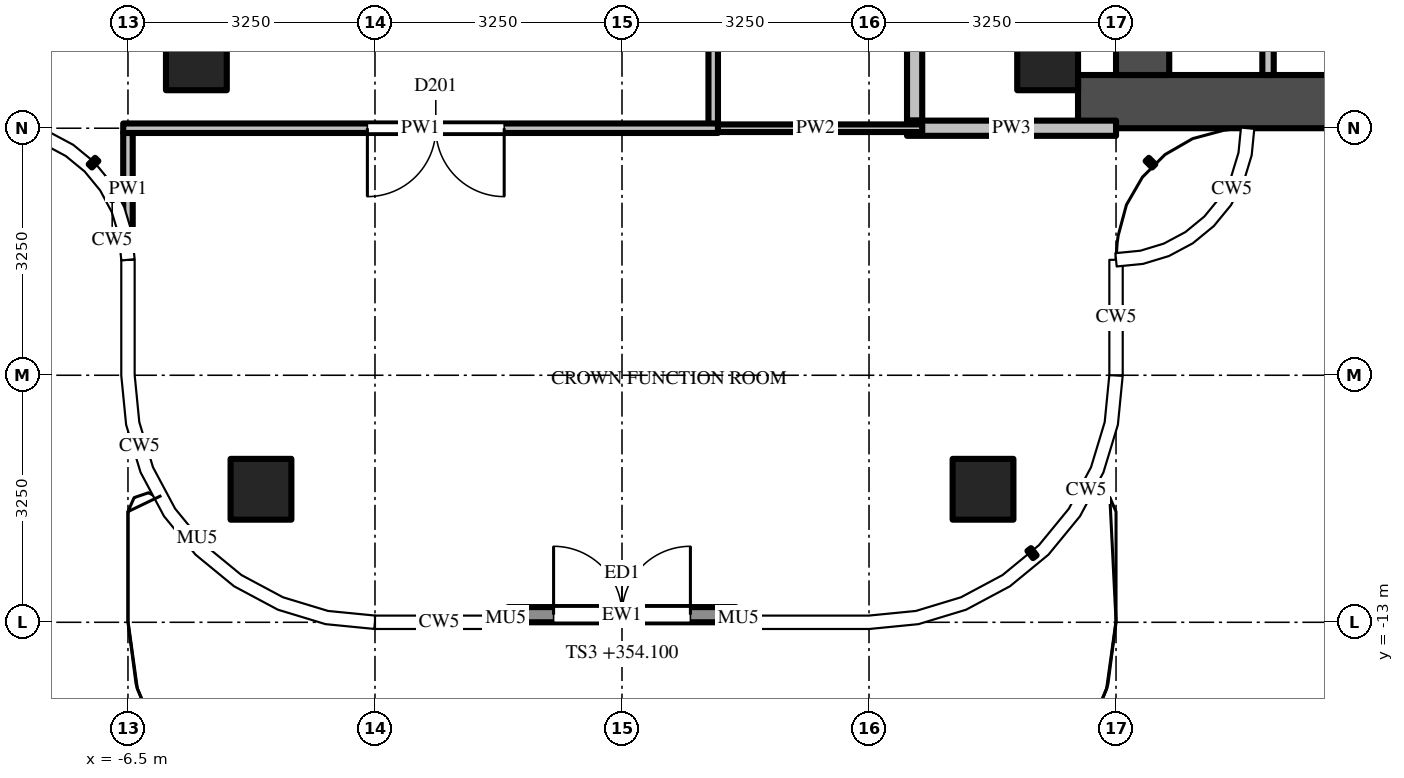
"""IFC4 building model, lengths in metres.
Left out: names, types, materials, properties, quantities, classifications, styles, units other than length and angle.
Written with IfcOpenShell. Run it as: python <this file> out.ifc"""

import sys

from ifc_helpers import new_model, si_unit, direction, frame, frame_2d, origin, origin_2d, place, context, subcontext, project, spatial, rectangle, extrude, source, transform, mapped, element, fill, save


model = new_model("IFC4")
c1 = context("Model", 3, precision=1e-05, world=origin(), true_north=direction((0.0, 1.0)))
c2 = subcontext(c1, "Body", "Model", "MODEL_VIEW")
j1 = project(units=[si_unit("LENGTHUNIT", "METRE"), si_unit("PLANEANGLEUNIT", "RADIAN")], contexts=[c1])
p1 = place(None, origin())
s1 = spatial("IfcSite", under=j1, at=p1, CompositionType="ELEMENT")
p2 = place(p1, origin())
s2 = spatial("IfcBuilding", under=s1, at=p2, CompositionType="ELEMENT")
p3 = place(p2, frame((0.0, 0.0, 354.1)))
s3 = spatial("IfcBuildingStorey", under=s2, at=p3, CompositionType="ELEMENT", Elevation=354.1)
m1 = source(origin(), c2, "Body", "SweptSolid", [
    extrude(rectangle(XDim=0.8, YDim=0.8, at=origin_2d()), origin(), (0.0, 0.0, 1.0), 4.0),
])
for number, where, z_axis, x_axis in (
    (1, (5.6, -5.6, 0.0), (0.0, 0.0, 1.0), (1.0, 0.0, 0.0)),
    (2, (-5.6, -5.6, 0.0), (0.0, 0.0, 1.0), (1.0, 0.0, 0.0)),
    (3, (4.75, -11.25, 0.0), (0.0, 0.0, 1.0), (1.0, 0.0, 0.0)),
    (4, (-4.75, -11.25, 0.0), (0.0, 0.0, 1.0), (1.0, 0.0, 0.0)),
):
    element("IfcColumn", number, at=place(p3, frame(where, z_axis=z_axis, x_axis=x_axis)), inside=s3, PredefinedType="COLUMN", context=c2, shape_type="MappedRepresentation", body=[
        mapped(m1, transform((0.0, 0.0, 0.0))),
    ])
m2 = source(origin(), c2, "Body", "SweptSolid", [
    extrude(rectangle(XDim=16.75, YDim=0.7, at=frame_2d((8.375, 0.0))), origin(), (0.0, 0.0, 1.0), 3.75),
])
p4 = place(p3, frame((6.0, -6.15, 0.0), z_axis=(0.0, 0.0, 1.0), x_axis=(1.0, 0.0, 0.0)))
e5 = element("IfcWall", 5, at=p4, inside=s3, PredefinedType="SHEAR", context=c2, shape_type="MappedRepresentation", body=[
    mapped(m2, transform((0.0, 0.0, 0.0))),
])
m3 = source(origin(), c2, "Body", "SweptSolid", [
    extrude(rectangle(XDim=9.05, YDim=0.7, at=frame_2d((4.525, 0.0))), origin(), (0.0, 0.0, 1.0), 3.75),
])
p5 = place(p3, frame((6.85, -5.8, 0.0), z_axis=(0.0, 0.0, 1.0), x_axis=(0.0, 1.0, 0.0)))
e6 = element("IfcWall", 6, at=p5, inside=s3, PredefinedType="SHEAR", context=c2, shape_type="MappedRepresentation", body=[
    mapped(m3, transform((0.0, 0.0, 0.0))),
])
m4 = source(origin(), c2, "Body", "SweptSolid", [
    extrude(rectangle(XDim=1.8, YDim=2.1, at=frame_2d((0.9, 1.05))), frame((0.0, 0.36, 0.0), z_axis=(0.0, -1.0, 0.0), x_axis=(1.0, 0.0, 0.0)), (0.0, 0.0, 1.0), 0.72),
])
p6 = place(p5, frame((3.15, 0.0, 0.0)))
e7 = element("IfcOpeningElement", 7, at=p6, cuts=e6, PredefinedType="OPENING", context=c2, shape_type="MappedRepresentation", body=[
    mapped(m4, transform((0.0, 0.0, 0.0))),
])
m5 = source(origin(), c2, "Body", "SweptSolid", [
    extrude(rectangle(XDim=2.2, YDim=0.15, at=frame_2d((1.1, 0.0))), origin(), (0.0, 0.0, 1.0), 3.75),
])
p7 = place(p3, frame((8.5, -5.8, 0.0), z_axis=(0.0, 0.0, 1.0), x_axis=(0.0, 1.0, 0.0)))
e8 = element("IfcWall", 8, at=p7, inside=s3, PredefinedType="PARTITIONING", context=c2, shape_type="MappedRepresentation", body=[
    mapped(m5, transform((0.0, 0.0, 0.0))),
])
m6 = source(origin(), c2, "Body", "SweptSolid", [
    extrude(rectangle(XDim=3.0, YDim=0.2, at=frame_2d((1.5, 0.0))), origin(), (0.0, 0.0, 1.0), 3.75),
])
p8 = place(p3, frame((-1.5, -12.9, 0.0), z_axis=(0.0, 0.0, 1.0), x_axis=(1.0, 0.0, 0.0)))
e9 = element("IfcWall", 9, at=p8, inside=s3, PredefinedType="SOLIDWALL", context=c2, shape_type="MappedRepresentation", body=[
    mapped(m6, transform((0.0, 0.0, 0.0))),
])
m7 = source(origin(), c2, "Body", "SweptSolid", [
    extrude(rectangle(XDim=1.8, YDim=2.4, at=frame_2d((0.9, 1.2))), frame((0.0, 0.11, 0.0), z_axis=(0.0, -1.0, 0.0), x_axis=(1.0, 0.0, 0.0)), (0.0, 0.0, 1.0), 0.22),
])
p9 = place(p8, frame((0.6, 0.0, 0.0)))
e10 = element("IfcOpeningElement", 10, at=p9, cuts=e9, PredefinedType="OPENING", context=c2, shape_type="MappedRepresentation", body=[
    mapped(m7, transform((0.0, 0.0, 0.0))),
])
m8 = source(origin(), c2, "Body", "SweptSolid", [
    extrude(rectangle(XDim=1.469, YDim=0.125, at=frame_2d((0.734, 0.0))), origin(), (0.0, 0.0, 1.0), 3.75),
])
p10 = place(p3, frame((-6.5, -6.562, 0.0), z_axis=(0.0, 0.0, 1.0), x_axis=(0.0, -1.0, 0.0)))
e11 = element("IfcWall", 11, at=p10, inside=s3, PredefinedType="PARTITIONING", context=c2, shape_type="MappedRepresentation", body=[
    mapped(m8, transform((0.0, 0.0, 0.0))),
])
m9 = source(origin(), c2, "Body", "SweptSolid", [
    extrude(rectangle(XDim=3.137, YDim=0.125, at=frame_2d((1.569, 0.0))), origin(), (0.0, 0.0, 1.0), 3.046),
])
p11 = place(p3, frame((1.2, -3.312, 0.0), z_axis=(0.0, 0.0, 1.0), x_axis=(0.0, -1.0, 0.0)))
e12 = element("IfcWall", 12, at=p11, inside=s3, PredefinedType="PARTITIONING", context=c2, shape_type="MappedRepresentation", body=[
    mapped(m9, transform((0.0, 0.0, 0.0))),
])
m10 = source(origin(), c2, "Body", "SweptSolid", [
    extrude(rectangle(XDim=1.1, YDim=2.1, at=frame_2d((0.55, 1.05))), frame((0.0, 0.073, 0.0), z_axis=(0.0, -1.0, 0.0), x_axis=(1.0, 0.0, 0.0)), (0.0, 0.0, 1.0), 0.145),
])
p12 = place(p11, frame((0.288, 0.0, 0.0)))
e13 = element("IfcOpeningElement", 13, at=p12, cuts=e12, PredefinedType="OPENING", context=c2, shape_type="MappedRepresentation", body=[
    mapped(m10, transform((0.0, 0.0, 0.0))),
])
m11 = source(origin(), c2, "Body", "SweptSolid", [
    extrude(rectangle(XDim=3.087, YDim=0.2, at=frame_2d((1.544, 0.0))), origin(), (0.0, 0.0, 1.0), 3.046),
])
p13 = place(p3, frame((3.85, -6.4, 0.0), z_axis=(0.0, 0.0, 1.0), x_axis=(0.0, 1.0, 0.0)))
e14 = element("IfcWall", 14, at=p13, inside=s3, PredefinedType="PARTITIONING", context=c2, shape_type="MappedRepresentation", body=[
    mapped(m11, transform((0.0, 0.0, 0.0))),
])
p14 = place(p3, frame((3.75, -6.5, 0.0), z_axis=(0.0, 0.0, 1.0), x_axis=(1.0, 0.0, 0.0)))
e15 = element("IfcWall", 15, at=p14, inside=s3, PredefinedType="PARTITIONING", context=c2, shape_type="SweptSolid", body=[
    extrude(rectangle(XDim=2.75, YDim=0.2, at=frame_2d((1.375, 0.0))), origin(), (0.0, 0.0, 1.0), 2.83),
])
p15 = place(p3, frame((1.137, -6.5, 0.0), z_axis=(0.0, 0.0, 1.0), x_axis=(1.0, 0.0, 0.0)))
e16 = element("IfcWall", 16, at=p15, inside=s3, PredefinedType="PARTITIONING", context=c2, shape_type="SweptSolid", body=[
    extrude(rectangle(XDim=2.812, YDim=0.1, at=frame_2d((1.406, 0.0))), origin(), (0.0, 0.0, 1.0), 3.75),
])
m12 = source(origin(), c2, "Body", "SweptSolid", [
    extrude(rectangle(XDim=7.825, YDim=0.125, at=frame_2d((3.913, 0.0))), origin(), (0.0, 0.0, 1.0), 2.83),
])
p16 = place(p3, frame((1.262, -6.5, 0.0), z_axis=(0.0, 0.0, 1.0), x_axis=(-1.0, 0.0, 0.0)))
e17 = element("IfcWall", 17, at=p16, inside=s3, PredefinedType="PARTITIONING", context=c2, shape_type="MappedRepresentation", body=[
    mapped(m12, transform((0.0, 0.0, 0.0))),
])
m13 = source(origin(), c2, "Body", "SweptSolid", [
    extrude(rectangle(XDim=1.8, YDim=2.1, at=frame_2d((0.9, 1.05))), frame((0.0, 0.073, 0.0), z_axis=(0.0, -1.0, 0.0), x_axis=(1.0, 0.0, 0.0)), (0.0, 0.0, 1.0), 0.145),
])
p17 = place(p16, frame((2.812, 0.0, 0.0)))
e18 = element("IfcOpeningElement", 18, at=p17, cuts=e17, PredefinedType="OPENING", context=c2, shape_type="MappedRepresentation", body=[
    mapped(m13, transform((0.0, 0.0, 0.0))),
])
m14 = source(origin(), c2, "Body", "SweptSolid", [
    extrude(rectangle(XDim=1.8, YDim=2.4, at=frame_2d((0.9, 1.2))), frame((0.0, 0.025, 0.0), z_axis=(0.0, -1.0, 0.0), x_axis=(1.0, 0.0, 0.0)), (0.0, 0.0, 1.0), 0.05),
])
p18 = place(p9, origin())
e19 = element("IfcDoor", 19, at=p18, inside=s3, OperationType="DOUBLE_DOOR_SINGLE_SWING", PredefinedType="DOOR", context=c2, shape_type="MappedRepresentation", body=[
    mapped(m14, transform((0.0, 0.0, 0.0))),
])
fill(e10, e19)
m15 = source(origin(), c2, "Body", "SweptSolid", [
    extrude(rectangle(XDim=1.8, YDim=2.1, at=frame_2d((0.9, 1.05))), frame((0.0, 0.025, 0.0), z_axis=(0.0, -1.0, 0.0), x_axis=(1.0, 0.0, 0.0)), (0.0, 0.0, 1.0), 0.05),
])
p19 = place(p17, origin())
e20 = element("IfcDoor", 20, at=p19, inside=s3, OperationType="DOUBLE_DOOR_SINGLE_SWING", PredefinedType="DOOR", context=c2, shape_type="MappedRepresentation", body=[
    mapped(m15, transform((0.0, 0.0, 0.0))),
])
fill(e18, e20)
save(model, sys.argv[1])
